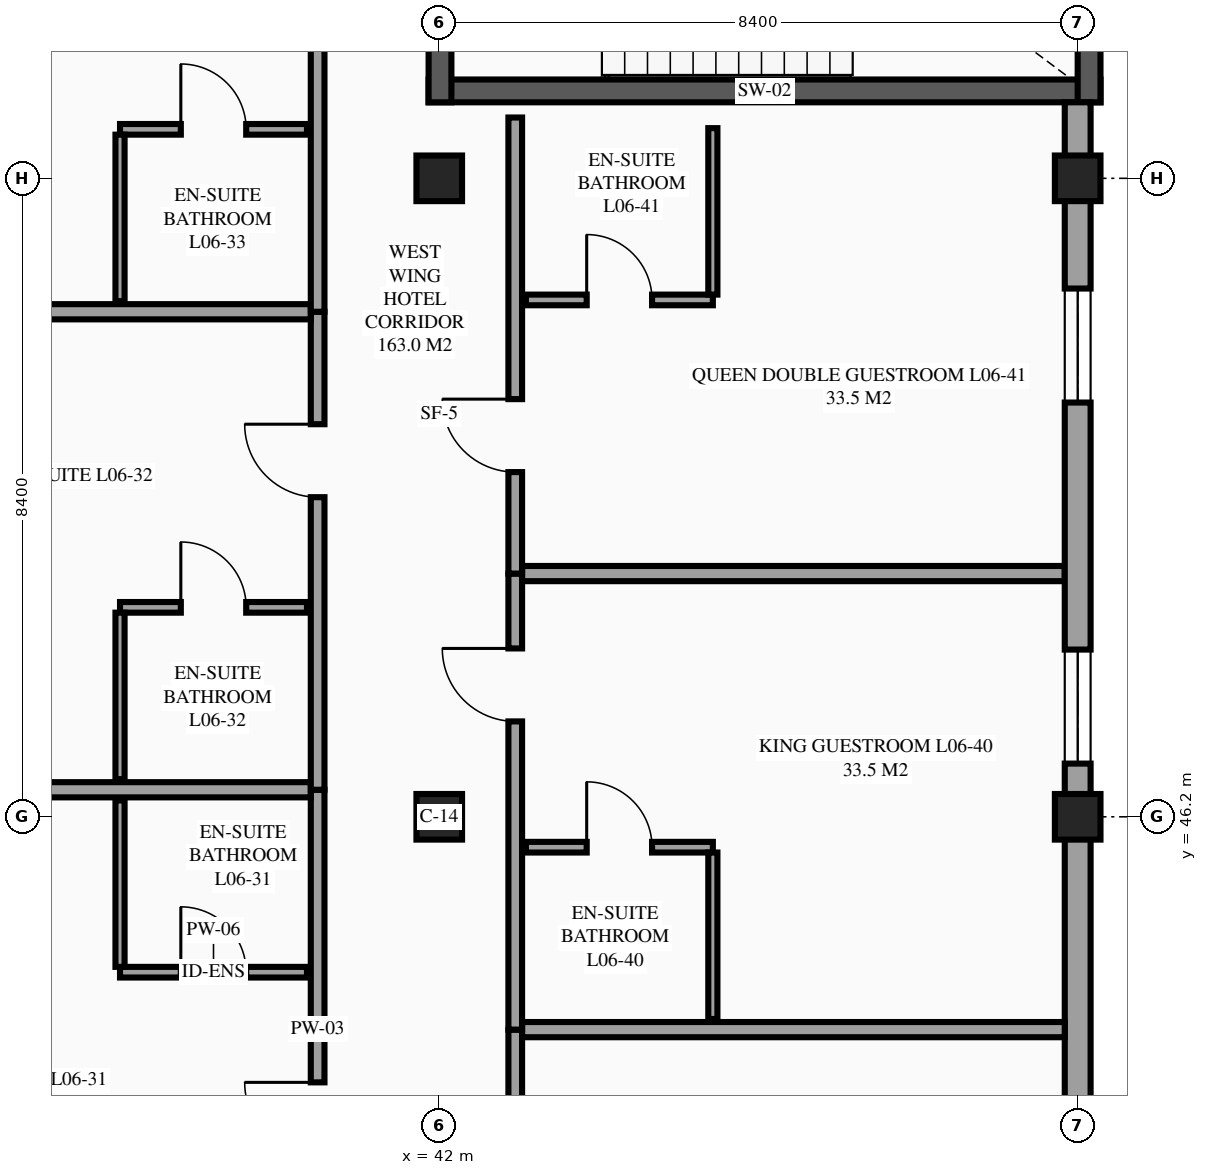
"""IFC4 building model, lengths in metres.
Left out: names, types, materials, properties, quantities, classifications, styles, units other than length and angle.
Written with IfcOpenShell. Run it as: python <this file> out.ifc"""

import sys

from ifc_helpers import new_model, si_unit, direction, frame, frame_2d, origin, origin_2d, place, context, subcontext, project, spatial, rectangle, extrude, element, fill, save


model = new_model("IFC4")
c1 = context("Model", 3, precision=1e-05, world=origin(), true_north=direction((0.0, 1.0)))
c2 = subcontext(c1, "Body", "Model", "MODEL_VIEW")
j1 = project(units=[si_unit("LENGTHUNIT", "METRE"), si_unit("PLANEANGLEUNIT", "RADIAN")], contexts=[c1])
p1 = place(None, origin())
s1 = spatial("IfcSite", under=j1, at=p1, CompositionType="ELEMENT")
p2 = place(p1, origin())
s2 = spatial("IfcBuilding", under=s1, at=p2, CompositionType="ELEMENT")
p3 = place(p2, frame((0.0, 0.0, 25.5)))
s3 = spatial("IfcBuildingStorey", under=s2, at=p3, CompositionType="ELEMENT", Elevation=25.5)
for number, where, z_axis, x_axis in (
    (1, (42.0, 46.2, 0.0), (0.0, 0.0, 1.0), (1.0, 0.0, 0.0)),
    (2, (42.0, 54.6, 0.0), (0.0, 0.0, 1.0), (1.0, 0.0, 0.0)),
    (3, (50.4, 46.2, 0.0), (0.0, 0.0, 1.0), (1.0, 0.0, 0.0)),
    (4, (50.4, 54.6, 0.0), (0.0, 0.0, 1.0), (1.0, 0.0, 0.0)),
):
    element("IfcColumn", number, at=place(p3, frame(where, z_axis=z_axis, x_axis=x_axis)), inside=s3, PredefinedType="COLUMN", context=c2, shape_type="SweptSolid", body=[
        extrude(rectangle(XDim=0.6, YDim=0.6, at=origin_2d()), origin(), (0.0, 0.0, 1.0), 3.6),
    ])
p4 = place(p3, frame((50.4, 29.4, 0.0), z_axis=(0.0, 0.0, 1.0), x_axis=(0.0, 1.0, 0.0)))
e5 = element("IfcWall", 5, at=p4, inside=s3, PredefinedType="STANDARD", context=c2, shape_type="SweptSolid", body=[
    extrude(rectangle(XDim=16.8, YDim=0.34, at=frame_2d((8.4, 0.0))), origin(), (0.0, 0.0, 1.0), 2.48),
])
p5 = place(p4, frame((0.75, 0.0, 0.85)))
e6 = element("IfcOpeningElement", 6, at=p5, cuts=e5, PredefinedType="OPENING", context=c2, shape_type="SweptSolid", body=[
    extrude(rectangle(XDim=1.5, YDim=1.5, at=frame_2d((0.75, 0.75))), frame((0.0, 0.18, 0.0), z_axis=(0.0, -1.0, 0.0), x_axis=(1.0, 0.0, 0.0)), (0.0, 0.0, 1.0), 0.36),
])
p6 = place(p4, frame((10.4, 0.0, 0.85)))
e7 = element("IfcOpeningElement", 7, at=p6, cuts=e5, PredefinedType="OPENING", context=c2, shape_type="SweptSolid", body=[
    extrude(rectangle(XDim=1.2, YDim=1.5, at=frame_2d((0.6, 0.75))), frame((0.0, 0.18, 0.0), z_axis=(0.0, -1.0, 0.0), x_axis=(1.0, 0.0, 0.0)), (0.0, 0.0, 1.0), 0.36),
])
p7 = place(p3, frame((41.86, 55.75, 0.0), z_axis=(0.0, 0.0, 1.0), x_axis=(1.0, 0.0, 0.0)))
e8 = element("IfcWall", 8, at=p7, inside=s3, PredefinedType="SHEAR", context=c2, shape_type="SweptSolid", body=[
    extrude(rectangle(XDim=8.84, YDim=0.3, at=frame_2d((4.42, 0.0))), origin(), (0.0, 0.0, 1.0), 3.6),
])
p8 = place(p3, frame((50.55, 55.6, 0.0), z_axis=(0.0, 0.0, 1.0), x_axis=(0.0, 1.0, 0.0)))
e9 = element("IfcWall", 9, at=p8, inside=s3, PredefinedType="SHEAR", context=c2, shape_type="SweptSolid", body=[
    extrude(rectangle(XDim=5.2, YDim=0.3, at=frame_2d((2.6, 0.0))), origin(), (0.0, 0.0, 1.0), 3.6),
])
p9 = place(p3, frame((42.01, 60.8, 0.0), z_axis=(0.0, 0.0, 1.0), x_axis=(0.0, -1.0, 0.0)))
e10 = element("IfcWall", 10, at=p9, inside=s3, PredefinedType="SHEAR", context=c2, shape_type="SweptSolid", body=[
    extrude(rectangle(XDim=5.2, YDim=0.3, at=frame_2d((2.6, 0.0))), origin(), (0.0, 0.0, 1.0), 3.6),
])
p10 = place(p9, frame((3.0, 0.0, 0.0)))
e11 = element("IfcOpeningElement", 11, at=p10, cuts=e10, PredefinedType="OPENING", context=c2, shape_type="SweptSolid", body=[
    extrude(rectangle(XDim=1.15, YDim=2.15, at=frame_2d((0.575, 1.075))), frame((0.0, 0.16, 0.0), z_axis=(0.0, -1.0, 0.0), x_axis=(1.0, 0.0, 0.0)), (0.0, 0.0, 1.0), 0.32),
])
p11 = place(p3, frame((40.4, 40.267, 0.0), z_axis=(0.0, 0.0, 1.0), x_axis=(0.0, 1.0, 0.0)))
e12 = element("IfcWall", 12, at=p11, inside=s3, PredefinedType="PARTITIONING", context=c2, shape_type="SweptSolid", body=[
    extrude(rectangle(XDim=6.289, YDim=0.18, at=frame_2d((3.145, 0.0))), origin(), (0.0, 0.0, 1.0), 3.375),
])
p12 = place(p11, frame((1.479, 0.0, 0.0)))
e13 = element("IfcOpeningElement", 13, at=p12, cuts=e12, PredefinedType="OPENING", context=c2, shape_type="SweptSolid", body=[
    extrude(rectangle(XDim=0.96, YDim=2.15, at=frame_2d((0.48, 1.075))), frame((0.0, 0.1, 0.0), z_axis=(0.0, -1.0, 0.0), x_axis=(1.0, 0.0, 0.0)), (0.0, 0.0, 1.0), 0.2),
])
p13 = place(p3, frame((34.05, 46.556, 0.0), z_axis=(0.0, 0.0, 1.0), x_axis=(1.0, 0.0, 0.0)))
e14 = element("IfcWall", 14, at=p13, inside=s3, PredefinedType="PARTITIONING", context=c2, shape_type="SweptSolid", body=[
    extrude(rectangle(XDim=6.26, YDim=0.2, at=frame_2d((3.13, 0.0))), origin(), (0.0, 0.0, 1.0), 3.375),
])
p14 = place(p3, frame((37.8, 44.156, 0.0), z_axis=(0.0, 0.0, 1.0), x_axis=(1.0, 0.0, 0.0)))
e15 = element("IfcWall", 15, at=p14, inside=s3, PredefinedType="PARTITIONING", context=c2, shape_type="SweptSolid", body=[
    extrude(rectangle(XDim=2.46, YDim=0.14, at=frame_2d((1.23, 0.0))), origin(), (0.0, 0.0, 1.0), 3.375),
])
p15 = place(p14, frame((0.8, 0.0, 0.0)))
e16 = element("IfcOpeningElement", 16, at=p15, cuts=e15, PredefinedType="OPENING", context=c2, shape_type="SweptSolid", body=[
    extrude(rectangle(XDim=0.86, YDim=2.1, at=frame_2d((0.43, 1.05))), frame((0.0, 0.08, 0.0), z_axis=(0.0, -1.0, 0.0), x_axis=(1.0, 0.0, 0.0)), (0.0, 0.0, 1.0), 0.16),
])
p16 = place(p3, frame((37.8, 44.226, 0.0), z_axis=(0.0, 0.0, 1.0), x_axis=(0.0, 1.0, 0.0)))
e17 = element("IfcWall", 17, at=p16, inside=s3, PredefinedType="PARTITIONING", context=c2, shape_type="SweptSolid", body=[
    extrude(rectangle(XDim=2.19, YDim=0.12, at=frame_2d((1.095, 0.0))), origin(), (0.0, 0.0, 1.0), 3.375),
])
p17 = place(p3, frame((40.4, 46.556, 0.0), z_axis=(0.0, 0.0, 1.0), x_axis=(0.0, 1.0, 0.0)))
e18 = element("IfcWall", 18, at=p17, inside=s3, PredefinedType="PARTITIONING", context=c2, shape_type="SweptSolid", body=[
    extrude(rectangle(XDim=6.289, YDim=0.18, at=frame_2d((3.145, 0.0))), origin(), (0.0, 0.0, 1.0), 3.375),
])
p18 = place(p17, frame((3.849, 0.0, 0.0)))
e19 = element("IfcOpeningElement", 19, at=p18, cuts=e18, PredefinedType="OPENING", context=c2, shape_type="SweptSolid", body=[
    extrude(rectangle(XDim=0.96, YDim=2.15, at=frame_2d((0.48, 1.075))), frame((0.0, 0.1, 0.0), z_axis=(0.0, -1.0, 0.0), x_axis=(1.0, 0.0, 0.0)), (0.0, 0.0, 1.0), 0.2),
])
p19 = place(p3, frame((33.77, 52.844, 0.0), z_axis=(0.0, 0.0, 1.0), x_axis=(1.0, 0.0, 0.0)))
e20 = element("IfcWall", 20, at=p19, inside=s3, PredefinedType="PARTITIONING", context=c2, shape_type="SweptSolid", body=[
    extrude(rectangle(XDim=6.54, YDim=0.2, at=frame_2d((3.27, 0.0))), origin(), (0.0, 0.0, 1.0), 3.375),
])
p20 = place(p3, frame((37.8, 48.956, 0.0), z_axis=(0.0, 0.0, 1.0), x_axis=(1.0, 0.0, 0.0)))
e21 = element("IfcWall", 21, at=p20, inside=s3, PredefinedType="PARTITIONING", context=c2, shape_type="SweptSolid", body=[
    extrude(rectangle(XDim=2.46, YDim=0.14, at=frame_2d((1.23, 0.0))), origin(), (0.0, 0.0, 1.0), 3.375),
])
p21 = place(p20, frame((0.8, 0.0, 0.0)))
e22 = element("IfcOpeningElement", 22, at=p21, cuts=e21, PredefinedType="OPENING", context=c2, shape_type="SweptSolid", body=[
    extrude(rectangle(XDim=0.86, YDim=2.1, at=frame_2d((0.43, 1.05))), frame((0.0, 0.08, 0.0), z_axis=(0.0, -1.0, 0.0), x_axis=(1.0, 0.0, 0.0)), (0.0, 0.0, 1.0), 0.16),
])
p22 = place(p3, frame((37.8, 46.696, 0.0), z_axis=(0.0, 0.0, 1.0), x_axis=(0.0, 1.0, 0.0)))
e23 = element("IfcWall", 23, at=p22, inside=s3, PredefinedType="PARTITIONING", context=c2, shape_type="SweptSolid", body=[
    extrude(rectangle(XDim=2.19, YDim=0.12, at=frame_2d((1.095, 0.0))), origin(), (0.0, 0.0, 1.0), 3.375),
])
p23 = place(p3, frame((40.4, 52.844, 0.0), z_axis=(0.0, 0.0, 1.0), x_axis=(0.0, 1.0, 0.0)))
e24 = element("IfcWall", 24, at=p23, inside=s3, PredefinedType="PARTITIONING", context=c2, shape_type="SweptSolid", body=[
    extrude(rectangle(XDim=6.289, YDim=0.18, at=frame_2d((3.145, 0.0))), origin(), (0.0, 0.0, 1.0), 3.375),
])
p24 = place(p23, frame((3.85, 0.0, 0.0)))
e25 = element("IfcOpeningElement", 25, at=p24, cuts=e24, PredefinedType="OPENING", context=c2, shape_type="SweptSolid", body=[
    extrude(rectangle(XDim=0.96, YDim=2.15, at=frame_2d((0.48, 1.075))), frame((0.0, 0.1, 0.0), z_axis=(0.0, -1.0, 0.0), x_axis=(1.0, 0.0, 0.0)), (0.0, 0.0, 1.0), 0.2),
])
p25 = place(p3, frame((37.8, 55.244, 0.0), z_axis=(0.0, 0.0, 1.0), x_axis=(1.0, 0.0, 0.0)))
e26 = element("IfcWall", 26, at=p25, inside=s3, PredefinedType="PARTITIONING", context=c2, shape_type="SweptSolid", body=[
    extrude(rectangle(XDim=2.46, YDim=0.14, at=frame_2d((1.23, 0.0))), origin(), (0.0, 0.0, 1.0), 3.375),
])
p26 = place(p25, frame((0.8, 0.0, 0.0)))
e27 = element("IfcOpeningElement", 27, at=p26, cuts=e26, PredefinedType="OPENING", context=c2, shape_type="SweptSolid", body=[
    extrude(rectangle(XDim=0.86, YDim=2.1, at=frame_2d((0.43, 1.05))), frame((0.0, 0.08, 0.0), z_axis=(0.0, -1.0, 0.0), x_axis=(1.0, 0.0, 0.0)), (0.0, 0.0, 1.0), 0.16),
])
p27 = place(p3, frame((37.8, 52.984, 0.0), z_axis=(0.0, 0.0, 1.0), x_axis=(0.0, 1.0, 0.0)))
e28 = element("IfcWall", 28, at=p27, inside=s3, PredefinedType="PARTITIONING", context=c2, shape_type="SweptSolid", body=[
    extrude(rectangle(XDim=2.19, YDim=0.12, at=frame_2d((1.095, 0.0))), origin(), (0.0, 0.0, 1.0), 3.375),
])
p28 = place(p3, frame((43.0, 37.4, 0.0), z_axis=(0.0, 0.0, 1.0), x_axis=(0.0, 1.0, 0.0)))
e29 = element("IfcWall", 29, at=p28, inside=s3, PredefinedType="PARTITIONING", context=c2, shape_type="SweptSolid", body=[
    extrude(rectangle(XDim=6.0, YDim=0.18, at=frame_2d((3.0, 0.0))), origin(), (0.0, 0.0, 1.0), 3.375),
])
p29 = place(p28, frame((3.705, 0.0, 0.0)))
e30 = element("IfcOpeningElement", 30, at=p29, cuts=e29, PredefinedType="OPENING", context=c2, shape_type="SweptSolid", body=[
    extrude(rectangle(XDim=0.96, YDim=2.15, at=frame_2d((0.48, 1.075))), frame((0.0, 0.1, 0.0), z_axis=(0.0, -1.0, 0.0), x_axis=(1.0, 0.0, 0.0)), (0.0, 0.0, 1.0), 0.2),
])
p30 = place(p3, frame((43.09, 43.4, 0.0), z_axis=(0.0, 0.0, 1.0), x_axis=(1.0, 0.0, 0.0)))
e31 = element("IfcWall", 31, at=p30, inside=s3, PredefinedType="PARTITIONING", context=c2, shape_type="SweptSolid", body=[
    extrude(rectangle(XDim=7.14, YDim=0.2, at=frame_2d((3.57, 0.0))), origin(), (0.0, 0.0, 1.0), 3.375),
])
p31 = place(p3, frame((43.0, 43.4, 0.0), z_axis=(0.0, 0.0, 1.0), x_axis=(0.0, 1.0, 0.0)))
e32 = element("IfcWall", 32, at=p31, inside=s3, PredefinedType="PARTITIONING", context=c2, shape_type="SweptSolid", body=[
    extrude(rectangle(XDim=6.0, YDim=0.18, at=frame_2d((3.0, 0.0))), origin(), (0.0, 0.0, 1.0), 3.375),
])
p32 = place(p31, frame((4.055, 0.0, 0.0)))
e33 = element("IfcOpeningElement", 33, at=p32, cuts=e32, PredefinedType="OPENING", context=c2, shape_type="SweptSolid", body=[
    extrude(rectangle(XDim=0.96, YDim=2.15, at=frame_2d((0.48, 1.075))), frame((0.0, 0.1, 0.0), z_axis=(0.0, -1.0, 0.0), x_axis=(1.0, 0.0, 0.0)), (0.0, 0.0, 1.0), 0.2),
])
p33 = place(p3, frame((43.09, 49.4, 0.0), z_axis=(0.0, 0.0, 1.0), x_axis=(1.0, 0.0, 0.0)))
e34 = element("IfcWall", 34, at=p33, inside=s3, PredefinedType="PARTITIONING", context=c2, shape_type="SweptSolid", body=[
    extrude(rectangle(XDim=7.14, YDim=0.2, at=frame_2d((3.57, 0.0))), origin(), (0.0, 0.0, 1.0), 3.375),
])
p34 = place(p3, frame((43.14, 45.8, 0.0), z_axis=(0.0, 0.0, 1.0), x_axis=(1.0, 0.0, 0.0)))
e35 = element("IfcWall", 35, at=p34, inside=s3, PredefinedType="PARTITIONING", context=c2, shape_type="SweptSolid", body=[
    extrude(rectangle(XDim=2.46, YDim=0.14, at=frame_2d((1.23, 0.0))), origin(), (0.0, 0.0, 1.0), 3.375),
])
p35 = place(p34, frame((0.8, 0.0, 0.0)))
e36 = element("IfcOpeningElement", 36, at=p35, cuts=e35, PredefinedType="OPENING", context=c2, shape_type="SweptSolid", body=[
    extrude(rectangle(XDim=0.86, YDim=2.1, at=frame_2d((0.43, 1.05))), frame((0.0, 0.08, 0.0), z_axis=(0.0, -1.0, 0.0), x_axis=(1.0, 0.0, 0.0)), (0.0, 0.0, 1.0), 0.16),
])
p36 = place(p3, frame((45.6, 43.54, 0.0), z_axis=(0.0, 0.0, 1.0), x_axis=(0.0, 1.0, 0.0)))
e37 = element("IfcWall", 37, at=p36, inside=s3, PredefinedType="PARTITIONING", context=c2, shape_type="SweptSolid", body=[
    extrude(rectangle(XDim=2.19, YDim=0.12, at=frame_2d((1.095, 0.0))), origin(), (0.0, 0.0, 1.0), 3.375),
])
p37 = place(p3, frame((43.0, 49.4, 0.0), z_axis=(0.0, 0.0, 1.0), x_axis=(0.0, 1.0, 0.0)))
e38 = element("IfcWall", 38, at=p37, inside=s3, PredefinedType="PARTITIONING", context=c2, shape_type="SweptSolid", body=[
    extrude(rectangle(XDim=6.0, YDim=0.18, at=frame_2d((3.0, 0.0))), origin(), (0.0, 0.0, 1.0), 3.375),
])
p38 = place(p37, frame((1.335, 0.0, 0.0)))
e39 = element("IfcOpeningElement", 39, at=p38, cuts=e38, PredefinedType="OPENING", context=c2, shape_type="SweptSolid", body=[
    extrude(rectangle(XDim=0.96, YDim=2.15, at=frame_2d((0.48, 1.075))), frame((0.0, 0.1, 0.0), z_axis=(0.0, -1.0, 0.0), x_axis=(1.0, 0.0, 0.0)), (0.0, 0.0, 1.0), 0.2),
])
p39 = place(p3, frame((43.14, 53.0, 0.0), z_axis=(0.0, 0.0, 1.0), x_axis=(1.0, 0.0, 0.0)))
e40 = element("IfcWall", 40, at=p39, inside=s3, PredefinedType="PARTITIONING", context=c2, shape_type="SweptSolid", body=[
    extrude(rectangle(XDim=2.46, YDim=0.14, at=frame_2d((1.23, 0.0))), origin(), (0.0, 0.0, 1.0), 3.375),
])
p40 = place(p39, frame((0.8, 0.0, 0.0)))
e41 = element("IfcOpeningElement", 41, at=p40, cuts=e40, PredefinedType="OPENING", context=c2, shape_type="SweptSolid", body=[
    extrude(rectangle(XDim=0.86, YDim=2.1, at=frame_2d((0.43, 1.05))), frame((0.0, 0.08, 0.0), z_axis=(0.0, -1.0, 0.0), x_axis=(1.0, 0.0, 0.0)), (0.0, 0.0, 1.0), 0.16),
])
p41 = place(p3, frame((45.6, 53.07, 0.0), z_axis=(0.0, 0.0, 1.0), x_axis=(0.0, 1.0, 0.0)))
e42 = element("IfcWall", 42, at=p41, inside=s3, PredefinedType="PARTITIONING", context=c2, shape_type="SweptSolid", body=[
    extrude(rectangle(XDim=2.19, YDim=0.12, at=frame_2d((1.095, 0.0))), origin(), (0.0, 0.0, 1.0), 3.375),
])
p42 = place(p3, frame((50.4, 46.2, 0.0), z_axis=(0.0, 0.0, 1.0), x_axis=(0.0, 1.0, 0.0)))
e43 = element("IfcWall", 43, at=p42, inside=s3, PredefinedType="STANDARD", context=c2, shape_type="SweptSolid", body=[
    extrude(rectangle(XDim=8.4, YDim=0.34, at=frame_2d((4.2, 0.0))), origin(), (0.0, 0.0, 1.0), 2.58),
])
p43 = place(p42, frame((0.7, 0.0, 0.85)))
e44 = element("IfcOpeningElement", 44, at=p43, cuts=e43, PredefinedType="OPENING", context=c2, shape_type="SweptSolid", body=[
    extrude(rectangle(XDim=1.5, YDim=1.5, at=frame_2d((0.75, 0.75))), frame((0.0, 0.18, 0.0), z_axis=(0.0, -1.0, 0.0), x_axis=(1.0, 0.0, 0.0)), (0.0, 0.0, 1.0), 0.36),
])
p44 = place(p42, frame((5.45, 0.0, 0.85)))
e45 = element("IfcOpeningElement", 45, at=p44, cuts=e43, PredefinedType="OPENING", context=c2, shape_type="SweptSolid", body=[
    extrude(rectangle(XDim=1.5, YDim=1.5, at=frame_2d((0.75, 0.75))), frame((0.0, 0.18, 0.0), z_axis=(0.0, -1.0, 0.0), x_axis=(1.0, 0.0, 0.0)), (0.0, 0.0, 1.0), 0.36),
])
p45 = place(p3, frame((50.4, 54.6, 0.0), z_axis=(0.0, 0.0, 1.0), x_axis=(0.0, 1.0, 0.0)))
e46 = element("IfcWall", 46, at=p45, inside=s3, PredefinedType="STANDARD", context=c2, shape_type="SweptSolid", body=[
    extrude(rectangle(XDim=1.0, YDim=0.34, at=frame_2d((0.5, 0.0))), origin(), (0.0, 0.0, 1.0), 3.126),
])
p46 = place(p43, origin())
e47 = element("IfcWindow", 47, at=p46, inside=s3, PartitioningType="SINGLE_PANEL", PredefinedType="WINDOW", context=c2, shape_type="SweptSolid", body=[
    extrude(rectangle(XDim=1.5, YDim=1.5, at=frame_2d((0.75, 0.75))), frame((0.0, 0.03, 0.0), z_axis=(0.0, -1.0, 0.0), x_axis=(1.0, 0.0, 0.0)), (0.0, 0.0, 1.0), 0.06),
])
fill(e44, e47)
p47 = place(p44, origin())
e48 = element("IfcWindow", 48, at=p47, inside=s3, PartitioningType="SINGLE_PANEL", PredefinedType="WINDOW", context=c2, shape_type="SweptSolid", body=[
    extrude(rectangle(XDim=1.5, YDim=1.5, at=frame_2d((0.75, 0.75))), frame((0.0, 0.03, 0.0), z_axis=(0.0, -1.0, 0.0), x_axis=(1.0, 0.0, 0.0)), (0.0, 0.0, 1.0), 0.06),
])
fill(e45, e48)
p48 = place(p12, origin())
e49 = element("IfcDoor", 49, at=p48, inside=s3, OperationType="SINGLE_SWING_RIGHT", PredefinedType="DOOR", context=c2, shape_type="SweptSolid", body=[
    extrude(rectangle(XDim=0.96, YDim=2.15, at=frame_2d((0.48, 1.075))), frame((0.0, 0.025, 0.0), z_axis=(0.0, -1.0, 0.0), x_axis=(1.0, 0.0, 0.0)), (0.0, 0.0, 1.0), 0.05),
])
fill(e13, e49)
p49 = place(p15, origin())
e50 = element("IfcDoor", 50, at=p49, inside=s3, OperationType="SINGLE_SWING_LEFT", PredefinedType="DOOR", context=c2, shape_type="SweptSolid", body=[
    extrude(rectangle(XDim=0.86, YDim=2.1, at=frame_2d((0.43, 1.05))), frame((0.0, 0.025, 0.0), z_axis=(0.0, -1.0, 0.0), x_axis=(1.0, 0.0, 0.0)), (0.0, 0.0, 1.0), 0.05),
])
fill(e16, e50)
p50 = place(p18, origin())
e51 = element("IfcDoor", 51, at=p50, inside=s3, OperationType="SINGLE_SWING_RIGHT", PredefinedType="DOOR", context=c2, shape_type="SweptSolid", body=[
    extrude(rectangle(XDim=0.96, YDim=2.15, at=frame_2d((0.48, 1.075))), frame((0.0, 0.025, 0.0), z_axis=(0.0, -1.0, 0.0), x_axis=(1.0, 0.0, 0.0)), (0.0, 0.0, 1.0), 0.05),
])
fill(e19, e51)
p51 = place(p21, origin())
e52 = element("IfcDoor", 52, at=p51, inside=s3, OperationType="SINGLE_SWING_LEFT", PredefinedType="DOOR", context=c2, shape_type="SweptSolid", body=[
    extrude(rectangle(XDim=0.86, YDim=2.1, at=frame_2d((0.43, 1.05))), frame((0.0, 0.025, 0.0), z_axis=(0.0, -1.0, 0.0), x_axis=(1.0, 0.0, 0.0)), (0.0, 0.0, 1.0), 0.05),
])
fill(e22, e52)
p52 = place(p26, origin())
e53 = element("IfcDoor", 53, at=p52, inside=s3, OperationType="SINGLE_SWING_LEFT", PredefinedType="DOOR", context=c2, shape_type="SweptSolid", body=[
    extrude(rectangle(XDim=0.86, YDim=2.1, at=frame_2d((0.43, 1.05))), frame((0.0, 0.025, 0.0), z_axis=(0.0, -1.0, 0.0), x_axis=(1.0, 0.0, 0.0)), (0.0, 0.0, 1.0), 0.05),
])
fill(e27, e53)
p53 = place(p32, origin())
e54 = element("IfcDoor", 54, at=p53, inside=s3, OperationType="SINGLE_SWING_RIGHT", PredefinedType="DOOR", context=c2, shape_type="SweptSolid", body=[
    extrude(rectangle(XDim=0.96, YDim=2.15, at=frame_2d((0.48, 1.075))), frame((0.0, 0.025, 0.0), z_axis=(0.0, -1.0, 0.0), x_axis=(1.0, 0.0, 0.0)), (0.0, 0.0, 1.0), 0.05),
])
fill(e33, e54)
p54 = place(p35, origin())
e55 = element("IfcDoor", 55, at=p54, inside=s3, OperationType="SINGLE_SWING_LEFT", PredefinedType="DOOR", context=c2, shape_type="SweptSolid", body=[
    extrude(rectangle(XDim=0.86, YDim=2.1, at=frame_2d((0.43, 1.05))), frame((0.0, 0.025, 0.0), z_axis=(0.0, -1.0, 0.0), x_axis=(1.0, 0.0, 0.0)), (0.0, 0.0, 1.0), 0.05),
])
fill(e36, e55)
p55 = place(p38, origin())
e56 = element("IfcDoor", 56, at=p55, inside=s3, OperationType="SINGLE_SWING_RIGHT", PredefinedType="DOOR", context=c2, shape_type="SweptSolid", body=[
    extrude(rectangle(XDim=0.96, YDim=2.15, at=frame_2d((0.48, 1.075))), frame((0.0, 0.025, 0.0), z_axis=(0.0, -1.0, 0.0), x_axis=(1.0, 0.0, 0.0)), (0.0, 0.0, 1.0), 0.05),
])
fill(e39, e56)
p56 = place(p40, origin())
e57 = element("IfcDoor", 57, at=p56, inside=s3, OperationType="SINGLE_SWING_LEFT", PredefinedType="DOOR", context=c2, shape_type="SweptSolid", body=[
    extrude(rectangle(XDim=0.86, YDim=2.1, at=frame_2d((0.43, 1.05))), frame((0.0, 0.025, 0.0), z_axis=(0.0, -1.0, 0.0), x_axis=(1.0, 0.0, 0.0)), (0.0, 0.0, 1.0), 0.05),
])
fill(e41, e57)
save(model, sys.argv[1])
